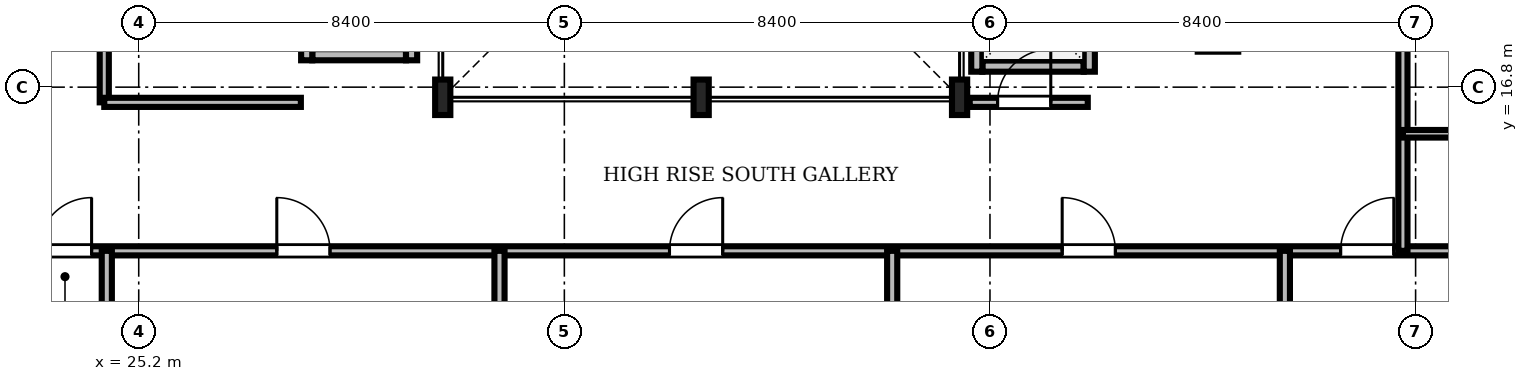
"""IFC4 building model, lengths in metres.
Left out: names, types, materials, properties, quantities, classifications, styles, units other than length and angle.
Written with IfcOpenShell. Run it as: python <this file> out.ifc"""

import sys

from ifc_helpers import new_model, si_unit, direction, frame, frame_2d, origin, origin_2d, place, context, subcontext, project, spatial, rectangle, i_section, extrude, source, transform, mapped, element, fill, save


model = new_model("IFC4")
c1 = context("Model", 3, precision=1e-05, world=origin(), true_north=direction((0.0, 1.0)))
c2 = subcontext(c1, "Body", "Model", "MODEL_VIEW")
j1 = project(units=[si_unit("LENGTHUNIT", "METRE"), si_unit("PLANEANGLEUNIT", "RADIAN")], contexts=[c1])
p1 = place(None, origin())
s1 = spatial("IfcSite", under=j1, at=p1, CompositionType="ELEMENT")
p2 = place(p1, origin())
s2 = spatial("IfcBuilding", under=s1, at=p2, CompositionType="ELEMENT")
p3 = place(p2, frame((0.0, 0.0, 188.55)))
s3 = spatial("IfcBuildingStorey", under=s2, at=p3, CompositionType="ELEMENT", Elevation=188.55)
m1 = source(origin(), c2, "Body", "SweptSolid", [
    extrude(i_section(OverallWidth=0.3, OverallDepth=0.7, WebThickness=0.017, FlangeThickness=0.032, FilletRadius=0.027, at=origin_2d()), origin(), (0.0, 0.0, 1.0), 3.53),
])
for number, where, z_axis, x_axis in (
    (1, (31.2, 16.6, 0.0), (0.0, 0.0, 1.0), (1.0, 0.0, 0.0)),
    (2, (36.3, 16.6, 0.0), (0.0, 0.0, 1.0), (1.0, 0.0, 0.0)),
    (3, (41.4, 16.6, 0.0), (0.0, 0.0, 1.0), (1.0, 0.0, 0.0)),
):
    element("IfcColumn", number, at=place(p3, frame(where, z_axis=z_axis, x_axis=x_axis)), inside=s3, PredefinedType="COLUMN", context=c2, shape_type="MappedRepresentation", body=[
        mapped(m1, transform((0.0, 0.0, 0.0), scale=1.0)),
    ])
m2 = source(origin(), c2, "Body", "SweptSolid", [
    extrude(rectangle(XDim=2.0, YDim=0.22, at=frame_2d((1.0, 0.0))), origin(), (0.0, 0.0, 1.0), 3.53),
])
p4 = place(p3, frame((41.85, 17.215, 0.0), z_axis=(0.0, 0.0, 1.0), x_axis=(1.0, 0.0, 0.0)))
e4 = element("IfcWall", 4, at=p4, inside=s3, PredefinedType="SOLIDWALL", context=c2, shape_type="MappedRepresentation", body=[
    mapped(m2, transform((0.0, 0.0, 0.0), scale=1.0)),
])
m3 = source(origin(), c2, "Body", "SweptSolid", [
    extrude(rectangle(XDim=2.19, YDim=0.22, at=frame_2d((1.095, 0.0))), origin(), (0.0, 0.0, 1.0), 3.53),
])
p5 = place(p3, frame((41.74, 17.105, 0.0), z_axis=(0.0, 0.0, 1.0), x_axis=(0.0, 1.0, 0.0)))
e5 = element("IfcWall", 5, at=p5, inside=s3, PredefinedType="SOLIDWALL", context=c2, shape_type="MappedRepresentation", body=[
    mapped(m3, transform((0.0, 0.0, 0.0), scale=1.0)),
])
p6 = place(p3, frame((43.96, 17.105, 0.0), z_axis=(0.0, 0.0, 1.0), x_axis=(0.0, 1.0, 0.0)))
e6 = element("IfcWall", 6, at=p6, inside=s3, PredefinedType="SOLIDWALL", context=c2, shape_type="MappedRepresentation", body=[
    mapped(m3, transform((0.0, 0.0, 0.0), scale=1.0)),
])
m4 = source(origin(), c2, "Body", "SweptSolid", [
    extrude(rectangle(XDim=1.1, YDim=2.2, at=frame_2d((0.55, 1.1))), frame((0.0, 0.12, 0.0), z_axis=(0.0, -1.0, 0.0), x_axis=(1.0, 0.0, 0.0)), (0.0, 0.0, 1.0), 0.24),
])
p7 = place(p6, frame((0.545, 0.0, 0.0)))
e7 = element("IfcOpeningElement", 7, at=p7, cuts=e6, PredefinedType="OPENING", context=c2, shape_type="MappedRepresentation", body=[
    mapped(m4, transform((0.0, 0.0, 0.0), scale=1.0)),
])
m5 = source(origin(), c2, "Body", "SweptSolid", [
    extrude(rectangle(XDim=1.85, YDim=0.22, at=frame_2d((0.925, 0.0))), origin(), (0.0, 0.0, 1.0), 2.972),
])
p8 = place(p3, frame((28.625, 17.44, 0.0), z_axis=(0.0, 0.0, 1.0), x_axis=(1.0, 0.0, 0.0)))
e8 = element("IfcWall", 8, at=p8, inside=s3, PredefinedType="SOLIDWALL", context=c2, shape_type="MappedRepresentation", body=[
    mapped(m5, transform((0.0, 0.0, 0.0), scale=1.0)),
])
m6 = source(origin(), c2, "Body", "SweptSolid", [
    extrude(rectangle(XDim=2.54, YDim=0.22, at=frame_2d((1.27, 0.0))), origin(), (0.0, 0.0, 1.0), 2.972),
])
p9 = place(p3, frame((28.515, 17.33, 0.0), z_axis=(0.0, 0.0, 1.0), x_axis=(0.0, 1.0, 0.0)))
e9 = element("IfcWall", 9, at=p9, inside=s3, PredefinedType="SOLIDWALL", context=c2, shape_type="MappedRepresentation", body=[
    mapped(m6, transform((0.0, 0.0, 0.0), scale=1.0)),
])
m7 = source(origin(), c2, "Body", "SweptSolid", [
    extrude(rectangle(XDim=2.54, YDim=0.22, at=frame_2d((1.27, 0.0))), origin(), (0.0, 0.0, 1.0), 3.53),
])
p10 = place(p3, frame((30.585, 17.33, 0.0), z_axis=(0.0, 0.0, 1.0), x_axis=(0.0, 1.0, 0.0)))
e10 = element("IfcWall", 10, at=p10, inside=s3, PredefinedType="SOLIDWALL", context=c2, shape_type="MappedRepresentation", body=[
    mapped(m7, transform((0.0, 0.0, 0.0), scale=1.0)),
])
m8 = source(origin(), c2, "Body", "SweptSolid", [
    extrude(rectangle(XDim=46.156, YDim=0.18, at=frame_2d((23.078, 0.0))), origin(), (0.0, 0.0, 1.0), 2.772),
])
p11 = place(p3, frame((11.422, 13.57, 0.0), z_axis=(0.0, 0.0, 1.0), x_axis=(1.0, 0.0, 0.0)))
e11 = element("IfcWall", 11, at=p11, inside=s3, PredefinedType="PARTITIONING", context=c2, shape_type="MappedRepresentation", body=[
    mapped(m8, transform((0.0, 0.0, 0.0), scale=1.0)),
])
m9 = source(origin(), c2, "Body", "SweptSolid", [
    extrude(rectangle(XDim=1.05, YDim=2.2, at=frame_2d((0.525, 1.1))), frame((0.0, 0.1, 0.0), z_axis=(0.0, -1.0, 0.0), x_axis=(1.0, 0.0, 0.0)), (0.0, 0.0, 1.0), 0.2),
])
p12 = place(p11, frame((11.798, 0.0, 0.0)))
e12 = element("IfcOpeningElement", 12, at=p12, cuts=e11, PredefinedType="OPENING", context=c2, shape_type="MappedRepresentation", body=[
    mapped(m9, transform((0.0, 0.0, 0.0), scale=1.0)),
])
p13 = place(p11, frame((16.503, 0.0, 0.0)))
e13 = element("IfcOpeningElement", 13, at=p13, cuts=e11, PredefinedType="OPENING", context=c2, shape_type="MappedRepresentation", body=[
    mapped(m9, transform((0.0, 0.0, 0.0), scale=1.0)),
])
p14 = place(p11, frame((24.253, 0.0, 0.0)))
e14 = element("IfcOpeningElement", 14, at=p14, cuts=e11, PredefinedType="OPENING", context=c2, shape_type="MappedRepresentation", body=[
    mapped(m9, transform((0.0, 0.0, 0.0), scale=1.0)),
])
p15 = place(p11, frame((32.003, 0.0, 0.0)))
e15 = element("IfcOpeningElement", 15, at=p15, cuts=e11, PredefinedType="OPENING", context=c2, shape_type="MappedRepresentation", body=[
    mapped(m9, transform((0.0, 0.0, 0.0), scale=1.0)),
])
p16 = place(p11, frame((37.498, 0.0, 0.0)))
e16 = element("IfcOpeningElement", 16, at=p16, cuts=e11, PredefinedType="OPENING", context=c2, shape_type="MappedRepresentation", body=[
    mapped(m9, transform((0.0, 0.0, 0.0), scale=1.0)),
])
m10 = source(origin(), c2, "Body", "SweptSolid", [
    extrude(rectangle(XDim=27.53, YDim=0.18, at=frame_2d((13.765, 0.0))), origin(), (0.0, 0.0, 1.0), 2.972),
])
p17 = place(p3, frame((50.15, 13.57, 0.0), z_axis=(0.0, 0.0, 1.0), x_axis=(0.0, 1.0, 0.0)))
e17 = element("IfcWall", 17, at=p17, inside=s3, PredefinedType="PARTITIONING", context=c2, shape_type="MappedRepresentation", body=[
    mapped(m10, transform((0.0, 0.0, 0.0), scale=1.0)),
])
p18 = place(p17, frame((5.217, 0.0, 0.0)))
e18 = element("IfcOpeningElement", 18, at=p18, cuts=e17, PredefinedType="OPENING", context=c2, shape_type="MappedRepresentation", body=[
    mapped(m9, transform((0.0, 0.0, 0.0), scale=1.0)),
])
p19 = place(p17, frame((14.32, 0.0, 0.0)))
e19 = element("IfcOpeningElement", 19, at=p19, cuts=e17, PredefinedType="OPENING", context=c2, shape_type="MappedRepresentation", body=[
    mapped(m9, transform((0.0, 0.0, 0.0), scale=1.0)),
])
p20 = place(p17, frame((23.423, 0.0, 0.0)))
e20 = element("IfcOpeningElement", 20, at=p20, cuts=e17, PredefinedType="OPENING", context=c2, shape_type="MappedRepresentation", body=[
    mapped(m9, transform((0.0, 0.0, 0.0), scale=1.0)),
])
m11 = source(origin(), c2, "Body", "SweptSolid", [
    extrude(rectangle(XDim=11.94, YDim=0.18, at=frame_2d((5.97, 0.0))), origin(), (0.0, 0.0, 1.0), 2.972),
])
p21 = place(p3, frame((24.52, 16.5, 0.0), z_axis=(0.0, 0.0, 1.0), x_axis=(0.0, 1.0, 0.0)))
e21 = element("IfcWall", 21, at=p21, inside=s3, PredefinedType="PARTITIONING", context=c2, shape_type="MappedRepresentation", body=[
    mapped(m11, transform((0.0, 0.0, 0.0), scale=1.0)),
])
p22 = place(p21, frame((4.5, 0.0, 0.0)))
e22 = element("IfcOpeningElement", 22, at=p22, cuts=e21, PredefinedType="OPENING", context=c2, shape_type="MappedRepresentation", body=[
    mapped(m9, transform((0.0, 0.0, 0.0), scale=1.0)),
])
m12 = source(origin(), c2, "Body", "SweptSolid", [
    extrude(rectangle(XDim=2.33, YDim=0.18, at=frame_2d((1.165, 0.0))), origin(), (0.0, 0.0, 1.0), 2.972),
])
p23 = place(p3, frame((41.6, 16.5, 0.0), z_axis=(0.0, 0.0, 1.0), x_axis=(1.0, 0.0, 0.0)))
e23 = element("IfcWall", 23, at=p23, inside=s3, PredefinedType="PARTITIONING", context=c2, shape_type="MappedRepresentation", body=[
    mapped(m12, transform((0.0, 0.0, 0.0), scale=1.0)),
])
p24 = place(p23, frame((0.55, 0.0, 0.0)))
e24 = element("IfcOpeningElement", 24, at=p24, cuts=e23, PredefinedType="OPENING", context=c2, shape_type="MappedRepresentation", body=[
    mapped(m9, transform((0.0, 0.0, 0.0), scale=1.0)),
])
m13 = source(origin(), c2, "Body", "SweptSolid", [
    extrude(rectangle(XDim=11.448, YDim=0.2, at=frame_2d((5.724, 0.0))), origin(), (0.0, 0.0, 1.0), 2.772),
])
p25 = place(p3, frame((24.57, 2.122, 0.0), z_axis=(0.0, 0.0, 1.0), x_axis=(0.0, 1.0, 0.0)))
e25 = element("IfcWall", 25, at=p25, inside=s3, PredefinedType="PARTITIONING", context=c2, shape_type="MappedRepresentation", body=[
    mapped(m13, transform((0.0, 0.0, 0.0), scale=1.0)),
])
m14 = source(origin(), c2, "Body", "SweptSolid", [
    extrude(rectangle(XDim=11.64, YDim=0.2, at=frame_2d((5.82, 0.0))), origin(), (0.0, 0.0, 1.0), 2.772),
])
p26 = place(p3, frame((32.32, 1.93, 0.0), z_axis=(0.0, 0.0, 1.0), x_axis=(0.0, 1.0, 0.0)))
e26 = element("IfcWall", 26, at=p26, inside=s3, PredefinedType="PARTITIONING", context=c2, shape_type="MappedRepresentation", body=[
    mapped(m14, transform((0.0, 0.0, 0.0), scale=1.0)),
])
for number, where, z_axis, x_axis in (
    (27, (40.07, 2.122, 0.0), (0.0, 0.0, 1.0), (0.0, 1.0, 0.0)),
    (28, (47.82, 2.122, 0.0), (0.0, 0.0, 1.0), (0.0, 1.0, 0.0)),
):
    element("IfcWall", number, at=place(p3, frame(where, z_axis=z_axis, x_axis=x_axis)), inside=s3, PredefinedType="PARTITIONING", context=c2, shape_type="MappedRepresentation", body=[
        mapped(m13, transform((0.0, 0.0, 0.0), scale=1.0)),
    ])
m15 = source(origin(), c2, "Body", "SweptSolid", [
    extrude(rectangle(XDim=3.88, YDim=0.18, at=frame_2d((1.94, 0.0))), origin(), (0.0, 0.0, 1.0), 3.53),
])
p27 = place(p3, frame((24.52, 16.5, 0.0), z_axis=(0.0, 0.0, 1.0), x_axis=(1.0, 0.0, 0.0)))
e29 = element("IfcWall", 29, at=p27, inside=s3, PredefinedType="PARTITIONING", context=c2, shape_type="MappedRepresentation", body=[
    mapped(m15, transform((0.0, 0.0, 0.0), scale=1.0)),
])
m16 = source(origin(), c2, "Body", "SweptSolid", [
    extrude(rectangle(XDim=2.36, YDim=0.15, at=frame_2d((1.18, 0.0))), origin(), (0.0, 0.0, 1.0), 3.53),
])
p28 = place(p3, frame((50.15, 15.88, 0.0), z_axis=(0.0, 0.0, 1.0), x_axis=(1.0, 0.0, 0.0)))
e30 = element("IfcWall", 30, at=p28, inside=s3, PredefinedType="PARTITIONING", context=c2, shape_type="MappedRepresentation", body=[
    mapped(m16, transform((0.0, 0.0, 0.0), scale=1.0)),
])
m17 = source(origin(), c2, "Body", "SweptSolid", [
    extrude(rectangle(XDim=1.05, YDim=2.2, at=frame_2d((0.525, 1.1))), frame((0.0, 0.025, 0.0), z_axis=(0.0, -1.0, 0.0), x_axis=(1.0, 0.0, 0.0)), (0.0, 0.0, 1.0), 0.05),
])
p29 = place(p12, origin())
e31 = element("IfcDoor", 31, at=p29, inside=s3, OperationType="SINGLE_SWING_RIGHT", PredefinedType="DOOR", context=c2, shape_type="MappedRepresentation", body=[
    mapped(m17, transform((0.0, 0.0, 0.0), scale=1.0)),
])
fill(e12, e31)
p30 = place(p13, origin())
e32 = element("IfcDoor", 32, at=p30, inside=s3, OperationType="SINGLE_SWING_LEFT", PredefinedType="DOOR", context=c2, shape_type="MappedRepresentation", body=[
    mapped(m17, transform((0.0, 0.0, 0.0), scale=1.0)),
])
fill(e13, e32)
p31 = place(p14, origin())
e33 = element("IfcDoor", 33, at=p31, inside=s3, OperationType="SINGLE_SWING_RIGHT", PredefinedType="DOOR", context=c2, shape_type="MappedRepresentation", body=[
    mapped(m17, transform((0.0, 0.0, 0.0), scale=1.0)),
])
fill(e14, e33)
p32 = place(p15, origin())
e34 = element("IfcDoor", 34, at=p32, inside=s3, OperationType="SINGLE_SWING_LEFT", PredefinedType="DOOR", context=c2, shape_type="MappedRepresentation", body=[
    mapped(m17, transform((0.0, 0.0, 0.0), scale=1.0)),
])
fill(e15, e34)
p33 = place(p16, origin())
e35 = element("IfcDoor", 35, at=p33, inside=s3, OperationType="SINGLE_SWING_RIGHT", PredefinedType="DOOR", context=c2, shape_type="MappedRepresentation", body=[
    mapped(m17, transform((0.0, 0.0, 0.0), scale=1.0)),
])
fill(e16, e35)
p34 = place(p24, origin())
e36 = element("IfcDoor", 36, at=p34, inside=s3, OperationType="SINGLE_SWING_RIGHT", PredefinedType="DOOR", context=c2, shape_type="MappedRepresentation", body=[
    mapped(m17, transform((0.0, 0.0, 0.0), scale=1.0)),
])
fill(e24, e36)
save(model, sys.argv[1])
